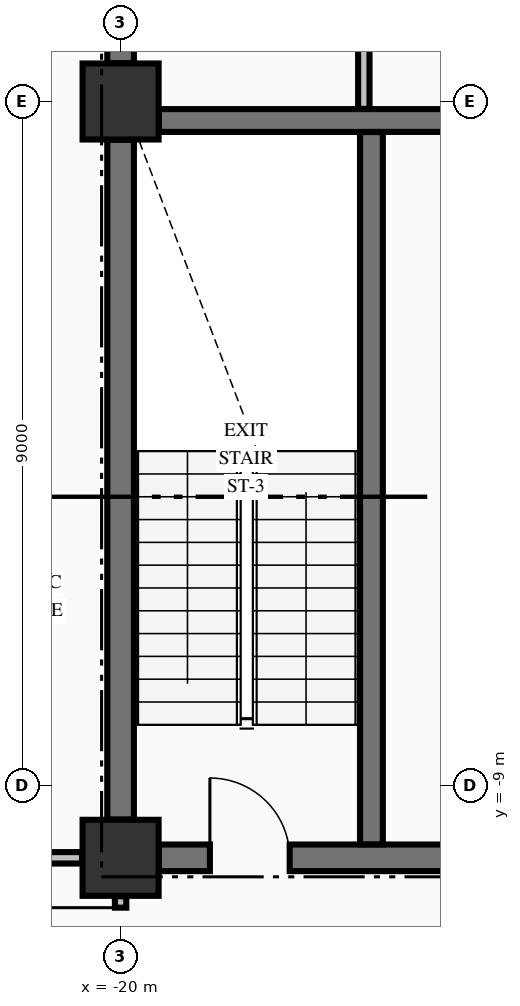
"""IFC4 building model, lengths in metres.
Left out: names, types, materials, properties, quantities, classifications, styles, units other than length and angle.
Written with IfcOpenShell. Run it as: python <this file> out.ifc"""

import sys

from ifc_helpers import new_model, si_unit, direction, frame, frame_2d, origin, origin_2d, place, context, subcontext, project, spatial, rectangle, extrude, element, fill, save


model = new_model("IFC4")
c1 = context("Model", 3, precision=1e-05, world=origin(), true_north=direction((0.0, 1.0)))
c2 = subcontext(c1, "Body", "Model", "MODEL_VIEW")
j1 = project(units=[si_unit("LENGTHUNIT", "METRE"), si_unit("PLANEANGLEUNIT", "RADIAN")], contexts=[c1])
p1 = place(None, origin())
s1 = spatial("IfcSite", under=j1, at=p1, CompositionType="ELEMENT")
p2 = place(p1, origin())
s2 = spatial("IfcBuilding", under=s1, at=p2, CompositionType="ELEMENT")
p3 = place(p2, frame((0.0, 0.0, 86.94)))
s3 = spatial("IfcBuildingStorey", under=s2, at=p3, CompositionType="ELEMENT", Elevation=86.94)
for number, where, z_axis, x_axis in (
    (1, (-20.0, -9.95, -0.425), (0.0, 0.0, 1.0), (1.0, 0.0, 0.0)),
    (2, (-20.0, 0.0, -0.425), (0.0, 0.0, 1.0), (1.0, 0.0, 0.0)),
):
    element("IfcColumn", number, at=place(p3, frame(where, z_axis=z_axis, x_axis=x_axis)), inside=s3, PredefinedType="COLUMN", context=c2, shape_type="SweptSolid", body=[
        extrude(rectangle(XDim=1.0, YDim=1.0, at=origin_2d()), origin(), (0.0, 0.0, 1.0), 4.595),
    ])
p4 = place(p3, frame((-19.496, -9.95, 0.0), z_axis=(0.0, 0.0, 1.0), x_axis=(1.0, 0.0, 0.0)))
e3 = element("IfcWall", 3, at=p4, inside=s3, PredefinedType="SHEAR", context=c2, shape_type="SweptSolid", body=[
    extrude(rectangle(XDim=4.796, YDim=0.35, at=frame_2d((2.398, 0.0))), origin(), (0.0, 0.0, 1.0), 4.17),
])
p5 = place(p4, frame((0.671, 0.0, 0.0)))
e4 = element("IfcOpeningElement", 4, at=p5, cuts=e3, PredefinedType="OPENING", context=c2, shape_type="SweptSolid", body=[
    extrude(rectangle(XDim=1.05, YDim=2.15, at=frame_2d((0.525, 1.075))), frame((0.0, 0.185, 0.0), z_axis=(0.0, -1.0, 0.0), x_axis=(1.0, 0.0, 0.0)), (0.0, 0.0, 1.0), 0.37),
])
p6 = place(p3, frame((-19.496, -0.25, 0.0), z_axis=(0.0, 0.0, 1.0), x_axis=(1.0, 0.0, 0.0)))
e5 = element("IfcWall", 5, at=p6, inside=s3, PredefinedType="SHEAR", context=c2, shape_type="SweptSolid", body=[
    extrude(rectangle(XDim=7.992, YDim=0.3, at=frame_2d((3.996, 0.0))), origin(), (0.0, 0.0, 1.0), 4.17),
])
p7 = place(p6, frame((5.796, 0.0, 0.0)))
e6 = element("IfcOpeningElement", 6, at=p7, cuts=e5, PredefinedType="OPENING", context=c2, shape_type="SweptSolid", body=[
    extrude(rectangle(XDim=1.1, YDim=2.15, at=frame_2d((0.55, 1.075))), frame((0.0, 0.16, 0.0), z_axis=(0.0, -1.0, 0.0), x_axis=(1.0, 0.0, 0.0)), (0.0, 0.0, 1.0), 0.32),
])
p8 = place(p3, frame((-22.835, -9.95, 0.0), z_axis=(0.0, 0.0, 1.0), x_axis=(1.0, 0.0, 0.0)))
e7 = element("IfcWall", 7, at=p8, inside=s3, PredefinedType="PARTITIONING", context=c2, shape_type="SweptSolid", body=[
    extrude(rectangle(XDim=2.329, YDim=0.15, at=frame_2d((1.165, 0.0))), origin(), (0.0, 0.0, 1.0), 4.17),
])
p9 = place(p8, frame((0.835, 0.0, 0.0)))
e8 = element("IfcOpeningElement", 8, at=p9, cuts=e7, PredefinedType="OPENING", context=c2, shape_type="SweptSolid", body=[
    extrude(rectangle(XDim=1.0, YDim=2.15, at=frame_2d((0.5, 1.075))), frame((0.0, 0.085, 0.0), z_axis=(0.0, -1.0, 0.0), x_axis=(1.0, 0.0, 0.0)), (0.0, 0.0, 1.0), 0.17),
])
p10 = place(p3, frame((-20.0, -9.446, 0.0), z_axis=(0.0, 0.0, 1.0), x_axis=(0.0, 1.0, 0.0)))
e9 = element("IfcWall", 9, at=p10, inside=s3, PredefinedType="SHEAR", context=c2, shape_type="SweptSolid", body=[
    extrude(rectangle(XDim=8.942, YDim=0.35, at=frame_2d((4.471, 0.0))), origin(), (0.0, 0.0, 1.0), 4.17),
])
p11 = place(p3, frame((-20.0, 0.504, 0.0), z_axis=(0.0, 0.0, 1.0), x_axis=(0.0, 1.0, 0.0)))
e10 = element("IfcWall", 10, at=p11, inside=s3, PredefinedType="SHEAR", context=c2, shape_type="SweptSolid", body=[
    extrude(rectangle(XDim=9.492, YDim=0.35, at=frame_2d((4.746, 0.0))), origin(), (0.0, 0.0, 1.0), 4.17),
])
p12 = place(p3, frame((-16.7, -9.773, 0.0), z_axis=(0.0, 0.0, 1.0), x_axis=(0.0, 1.0, 0.0)))
e11 = element("IfcWall", 11, at=p12, inside=s3, PredefinedType="SHEAR", context=c2, shape_type="SweptSolid", body=[
    extrude(rectangle(XDim=9.371, YDim=0.3, at=frame_2d((4.686, 0.0))), origin(), (0.0, 0.0, 1.0), 4.17),
])
p13 = place(p3, frame((-20.0, -12.122, 0.0), z_axis=(0.0, 0.0, 1.0), x_axis=(0.0, 1.0, 0.0)))
e12 = element("IfcWall", 12, at=p13, inside=s3, PredefinedType="PARTITIONING", context=c2, shape_type="SweptSolid", body=[
    extrude(rectangle(XDim=1.666, YDim=0.15, at=frame_2d((0.833, 0.0))), origin(), (0.0, 0.0, 1.0), 3.36),
])
p14 = place(p13, frame((0.566, 0.0, 0.0)))
e13 = element("IfcOpeningElement", 13, at=p14, cuts=e12, PredefinedType="OPENING", context=c2, shape_type="SweptSolid", body=[
    extrude(rectangle(XDim=0.95, YDim=2.15, at=frame_2d((0.475, 1.075))), frame((0.0, 0.085, 0.0), z_axis=(0.0, -1.0, 0.0), x_axis=(1.0, 0.0, 0.0)), (0.0, 0.0, 1.0), 0.17),
])
p15 = place(p3, frame((-16.8, -0.097, 0.0), z_axis=(0.0, 0.0, 1.0), x_axis=(0.0, 1.0, 0.0)))
e14 = element("IfcWall", 14, at=p15, inside=s3, PredefinedType="PARTITIONING", context=c2, shape_type="SweptSolid", body=[
    extrude(rectangle(XDim=4.819, YDim=0.15, at=frame_2d((2.409, 0.0))), origin(), (0.0, 0.0, 1.0), 4.17),
])
p16 = place(p5, origin())
e15 = element("IfcDoor", 15, at=p16, inside=s3, OperationType="SINGLE_SWING_LEFT", PredefinedType="DOOR", context=c2, shape_type="SweptSolid", body=[
    extrude(rectangle(XDim=1.05, YDim=2.15, at=frame_2d((0.525, 1.075))), frame((0.0, 0.025, 0.0), z_axis=(0.0, -1.0, 0.0), x_axis=(1.0, 0.0, 0.0)), (0.0, 0.0, 1.0), 0.05),
])
fill(e4, e15)
p17 = place(p14, origin())
e16 = element("IfcDoor", 16, at=p17, inside=s3, OperationType="SINGLE_SWING_RIGHT", PredefinedType="DOOR", context=c2, shape_type="SweptSolid", body=[
    extrude(rectangle(XDim=0.95, YDim=2.15, at=frame_2d((0.475, 1.075))), frame((0.0, 0.025, 0.0), z_axis=(0.0, -1.0, 0.0), x_axis=(1.0, 0.0, 0.0)), (0.0, 0.0, 1.0), 0.05),
])
fill(e13, e16)
save(model, sys.argv[1])
